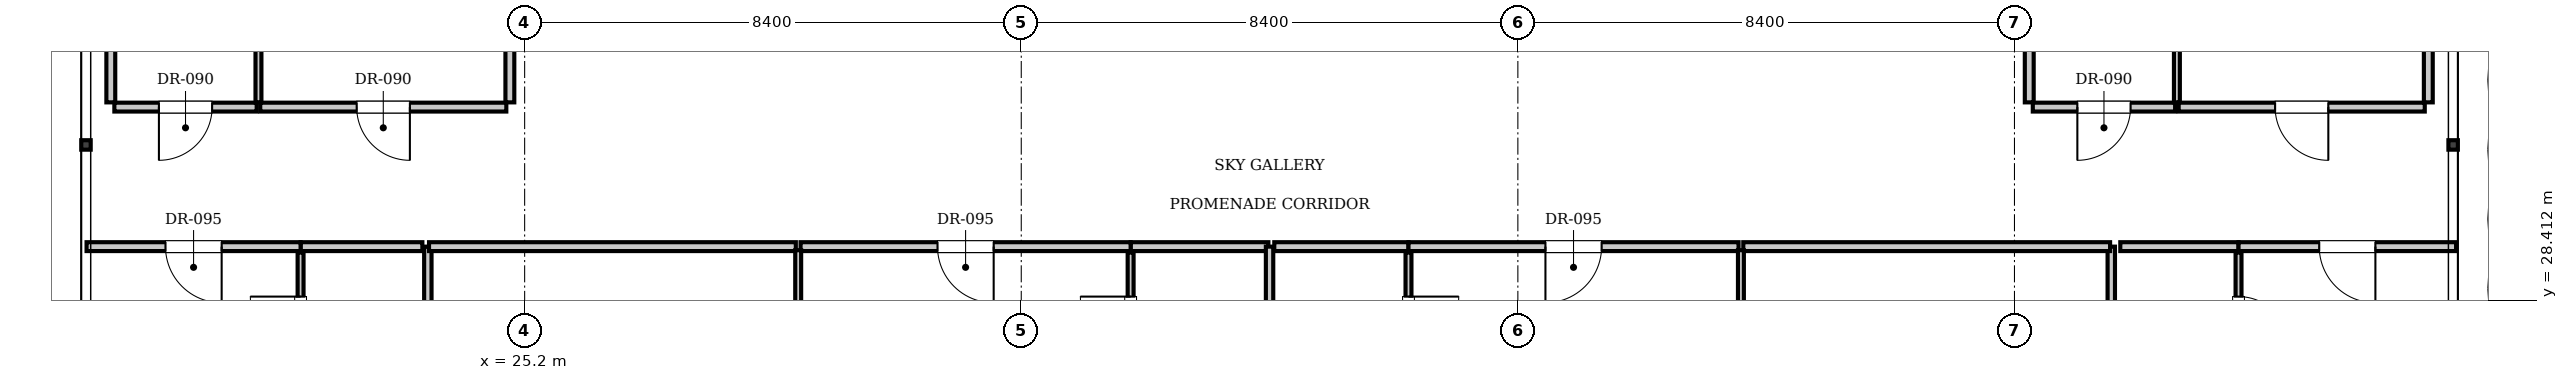
"""IFC4 building model, lengths in metres.
Left out: names, types, materials, properties, quantities, classifications, styles, units other than length and angle.
Written with IfcOpenShell. Run it as: python <this file> out.ifc"""

import sys

from ifc_helpers import new_model, si_unit, direction, frame, frame_2d, origin, place, context, subcontext, project, spatial, rectangle, extrude, element, fill, save


model = new_model("IFC4")
c1 = context("Model", 3, precision=1e-05, world=origin(), true_north=direction((0.0, 1.0)))
c2 = subcontext(c1, "Body", "Model", "MODEL_VIEW")
j1 = project(units=[si_unit("LENGTHUNIT", "METRE"), si_unit("PLANEANGLEUNIT", "RADIAN")], contexts=[c1])
p1 = place(None, origin())
s1 = spatial("IfcSite", under=j1, at=p1, CompositionType="ELEMENT")
p2 = place(p1, origin())
s2 = spatial("IfcBuilding", under=s1, at=p2, CompositionType="ELEMENT")
p3 = place(p2, frame((0.0, 0.0, 341.25)))
s3 = spatial("IfcBuildingStorey", under=s2, at=p3, CompositionType="ELEMENT", Elevation=341.25)
p4 = place(p3, frame((18.2, 31.76, 0.0), z_axis=(0.0, 0.0, 1.0), x_axis=(0.0, 1.0, 0.0)))
e1 = element("IfcWall", 1, at=p4, inside=s3, PredefinedType="PARTITIONING", context=c2, shape_type="SweptSolid", body=[
    extrude(rectangle(XDim=16.285, YDim=0.15, at=frame_2d((8.143, 0.0))), origin(), (0.0, 0.0, 1.0), 3.141),
])
p5 = place(p3, frame((24.95, 31.76, 0.0), z_axis=(0.0, 0.0, 1.0), x_axis=(0.0, 1.0, 0.0)))
e2 = element("IfcWall", 2, at=p5, inside=s3, PredefinedType="PARTITIONING", context=c2, shape_type="SweptSolid", body=[
    extrude(rectangle(XDim=16.285, YDim=0.15, at=frame_2d((8.143, 0.0))), origin(), (0.0, 0.0, 1.0), 3.61),
])
p6 = place(p3, frame((18.26, 31.68, 0.0), z_axis=(0.0, 0.0, 1.0), x_axis=(1.0, 0.0, 0.0)))
e3 = element("IfcWall", 3, at=p6, inside=s3, PredefinedType="PARTITIONING", context=c2, shape_type="SweptSolid", body=[
    extrude(rectangle(XDim=2.407, YDim=0.15, at=frame_2d((1.204, 0.0))), origin(), (0.0, 0.0, 1.0), 3.61),
])
p7 = place(p6, frame((0.754, 0.0, 0.0)))
e4 = element("IfcOpeningElement", 4, at=p7, cuts=e3, PredefinedType="OPENING", context=c2, shape_type="SweptSolid", body=[
    extrude(rectangle(XDim=0.9, YDim=2.1, at=frame_2d((0.45, 1.05))), frame((0.0, 0.085, 0.0), z_axis=(0.0, -1.0, 0.0), x_axis=(1.0, 0.0, 0.0)), (0.0, 0.0, 1.0), 0.17),
])
p8 = place(p3, frame((20.698, 31.76, 0.0), z_axis=(0.0, 0.0, 1.0), x_axis=(0.0, 1.0, 0.0)))
e5 = element("IfcWall", 5, at=p8, inside=s3, PredefinedType="PARTITIONING", context=c2, shape_type="SweptSolid", body=[
    extrude(rectangle(XDim=16.285, YDim=0.1, at=frame_2d((8.143, 0.0))), origin(), (0.0, 0.0, 1.0), 3.61),
])
p9 = place(p3, frame((20.728, 31.68, 0.0), z_axis=(0.0, 0.0, 1.0), x_axis=(1.0, 0.0, 0.0)))
e6 = element("IfcWall", 6, at=p9, inside=s3, PredefinedType="PARTITIONING", context=c2, shape_type="SweptSolid", body=[
    extrude(rectangle(XDim=4.162, YDim=0.15, at=frame_2d((2.081, 0.0))), origin(), (0.0, 0.0, 1.0), 3.61),
])
p10 = place(p9, frame((1.631, 0.0, 0.0)))
e7 = element("IfcOpeningElement", 7, at=p10, cuts=e6, PredefinedType="OPENING", context=c2, shape_type="SweptSolid", body=[
    extrude(rectangle(XDim=0.9, YDim=2.1, at=frame_2d((0.45, 1.05))), frame((0.0, 0.085, 0.0), z_axis=(0.0, -1.0, 0.0), x_axis=(1.0, 0.0, 0.0)), (0.0, 0.0, 1.0), 0.17),
])
p11 = place(p3, frame((50.65, 31.76, 0.0), z_axis=(0.0, 0.0, 1.0), x_axis=(0.0, 1.0, 0.0)))
e8 = element("IfcWall", 8, at=p11, inside=s3, PredefinedType="PARTITIONING", context=c2, shape_type="SweptSolid", body=[
    extrude(rectangle(XDim=16.285, YDim=0.15, at=frame_2d((8.143, 0.0))), origin(), (0.0, 0.0, 1.0), 3.61),
])
p12 = place(p3, frame((57.4, 31.76, 0.0), z_axis=(0.0, 0.0, 1.0), x_axis=(0.0, 1.0, 0.0)))
e9 = element("IfcWall", 9, at=p12, inside=s3, PredefinedType="PARTITIONING", context=c2, shape_type="SweptSolid", body=[
    extrude(rectangle(XDim=16.285, YDim=0.15, at=frame_2d((8.143, 0.0))), origin(), (0.0, 0.0, 1.0), 3.141),
])
p13 = place(p3, frame((50.71, 31.68, 0.0), z_axis=(0.0, 0.0, 1.0), x_axis=(1.0, 0.0, 0.0)))
e10 = element("IfcWall", 10, at=p13, inside=s3, PredefinedType="PARTITIONING", context=c2, shape_type="SweptSolid", body=[
    extrude(rectangle(XDim=2.407, YDim=0.15, at=frame_2d((1.204, 0.0))), origin(), (0.0, 0.0, 1.0), 3.61),
])
p14 = place(p13, frame((0.754, 0.0, 0.0)))
e11 = element("IfcOpeningElement", 11, at=p14, cuts=e10, PredefinedType="OPENING", context=c2, shape_type="SweptSolid", body=[
    extrude(rectangle(XDim=0.9, YDim=2.1, at=frame_2d((0.45, 1.05))), frame((0.0, 0.085, 0.0), z_axis=(0.0, -1.0, 0.0), x_axis=(1.0, 0.0, 0.0)), (0.0, 0.0, 1.0), 0.17),
])
p15 = place(p3, frame((53.147, 31.76, 0.0), z_axis=(0.0, 0.0, 1.0), x_axis=(0.0, 1.0, 0.0)))
e12 = element("IfcWall", 12, at=p15, inside=s3, PredefinedType="PARTITIONING", context=c2, shape_type="SweptSolid", body=[
    extrude(rectangle(XDim=16.285, YDim=0.1, at=frame_2d((8.143, 0.0))), origin(), (0.0, 0.0, 1.0), 3.61),
])
p16 = place(p3, frame((53.177, 31.68, 0.0), z_axis=(0.0, 0.0, 1.0), x_axis=(1.0, 0.0, 0.0)))
e13 = element("IfcWall", 13, at=p16, inside=s3, PredefinedType="PARTITIONING", context=c2, shape_type="SweptSolid", body=[
    extrude(rectangle(XDim=4.163, YDim=0.15, at=frame_2d((2.081, 0.0))), origin(), (0.0, 0.0, 1.0), 3.61),
])
p17 = place(p16, frame((1.631, 0.0, 0.0)))
e14 = element("IfcOpeningElement", 14, at=p17, cuts=e13, PredefinedType="OPENING", context=c2, shape_type="SweptSolid", body=[
    extrude(rectangle(XDim=0.9, YDim=2.1, at=frame_2d((0.45, 1.05))), frame((0.0, 0.085, 0.0), z_axis=(0.0, -1.0, 0.0), x_axis=(1.0, 0.0, 0.0)), (0.0, 0.0, 1.0), 0.17),
])
for number, where, z_axis, x_axis in (
    (15, (23.562, 19.34, 0.0), (0.0, 0.0, 1.0), (0.0, 1.0, 0.0)),
    (16, (52.038, 19.34, 0.0), (0.0, 0.0, 1.0), (0.0, 1.0, 0.0)),
):
    element("IfcWall", number, at=place(p3, frame(where, z_axis=z_axis, x_axis=x_axis)), inside=s3, PredefinedType="PARTITIONING", context=c2, shape_type="SweptSolid", body=[
        extrude(rectangle(XDim=9.98, YDim=0.125, at=frame_2d((4.99, 0.0))), origin(), (0.0, 0.0, 1.0), 3.61),
    ])
p18 = place(p3, frame((35.45, 29.32, 0.0), z_axis=(0.0, 0.0, 1.0), x_axis=(1.0, 0.0, 0.0)))
e17 = element("IfcWall", 17, at=p18, inside=s3, PredefinedType="PARTITIONING", context=c2, shape_type="SweptSolid", body=[
    extrude(rectangle(XDim=2.33, YDim=0.15, at=frame_2d((1.165, 0.0))), origin(), (0.0, 0.0, 1.0), 3.61),
])
p19 = place(p3, frame((35.45, 26.88, 0.0), z_axis=(0.0, 0.0, 1.0), x_axis=(0.0, 1.0, 0.0)))
e18 = element("IfcWall", 18, at=p19, inside=s3, PredefinedType="PARTITIONING", context=c2, shape_type="SweptSolid", body=[
    extrude(rectangle(XDim=2.34, YDim=0.1, at=frame_2d((1.17, 0.0))), origin(), (0.0, 0.0, 1.0), 3.61),
])
p20 = place(p19, frame((0.745, 0.0, 0.0)))
e19 = element("IfcOpeningElement", 19, at=p20, cuts=e18, PredefinedType="OPENING", context=c2, shape_type="SweptSolid", body=[
    extrude(rectangle(XDim=0.85, YDim=2.1, at=frame_2d((0.425, 1.05))), frame((0.0, 0.06, 0.0), z_axis=(0.0, -1.0, 0.0), x_axis=(1.0, 0.0, 0.0)), (0.0, 0.0, 1.0), 0.12),
])
p21 = place(p3, frame((23.583, 29.32, 0.0), z_axis=(0.0, 0.0, 1.0), x_axis=(1.0, 0.0, 0.0)))
e20 = element("IfcWall", 20, at=p21, inside=s3, PredefinedType="PARTITIONING", context=c2, shape_type="SweptSolid", body=[
    extrude(rectangle(XDim=6.205, YDim=0.15, at=frame_2d((3.102, 0.0))), origin(), (0.0, 0.0, 1.0), 3.61),
])
p22 = place(p3, frame((29.867, 29.32, 0.0), z_axis=(0.0, 0.0, 1.0), x_axis=(1.0, 0.0, 0.0)))
e21 = element("IfcWall", 21, at=p22, inside=s3, PredefinedType="PARTITIONING", context=c2, shape_type="SweptSolid", body=[
    extrude(rectangle(XDim=5.583, YDim=0.15, at=frame_2d((2.792, 0.0))), origin(), (0.0, 0.0, 1.0), 3.61),
])
p23 = place(p22, frame((2.316, 0.0, 0.0)))
e22 = element("IfcOpeningElement", 22, at=p23, cuts=e21, PredefinedType="OPENING", context=c2, shape_type="SweptSolid", body=[
    extrude(rectangle(XDim=0.95, YDim=2.15, at=frame_2d((0.475, 1.075))), frame((0.0, 0.085, 0.0), z_axis=(0.0, -1.0, 0.0), x_axis=(1.0, 0.0, 0.0)), (0.0, 0.0, 1.0), 0.17),
])
p24 = place(p3, frame((29.827, 13.83, 0.0), z_axis=(0.0, 0.0, 1.0), x_axis=(0.0, 1.0, 0.0)))
e23 = element("IfcWall", 23, at=p24, inside=s3, PredefinedType="PARTITIONING", context=c2, shape_type="SweptSolid", body=[
    extrude(rectangle(XDim=15.43, YDim=0.1, at=frame_2d((7.715, 0.0))), origin(), (0.0, 0.0, 1.0), 3.61),
])
p25 = place(p24, frame((1.6, 0.0, 0.0)))
e24 = element("IfcOpeningElement", 24, at=p25, cuts=e23, PredefinedType="OPENING", context=c2, shape_type="SweptSolid", body=[
    extrude(rectangle(XDim=0.9, YDim=2.1, at=frame_2d((0.45, 1.05))), frame((0.0, 0.06, 0.0), z_axis=(0.0, -1.0, 0.0), x_axis=(1.0, 0.0, 0.0)), (0.0, 0.0, 1.0), 0.12),
])
p26 = place(p3, frame((37.8, 13.9, 0.0), z_axis=(0.0, 0.0, 1.0), x_axis=(0.0, 1.0, 0.0)))
e25 = element("IfcWall", 25, at=p26, inside=s3, PredefinedType="PARTITIONING", context=c2, shape_type="SweptSolid", body=[
    extrude(rectangle(XDim=15.42, YDim=0.125, at=frame_2d((7.71, 0.0))), origin(), (0.0, 0.0, 1.0), 3.457),
])
p27 = place(p3, frame((37.88, 29.32, 0.0), z_axis=(0.0, 0.0, 1.0), x_axis=(1.0, 0.0, 0.0)))
e26 = element("IfcWall", 26, at=p27, inside=s3, PredefinedType="PARTITIONING", context=c2, shape_type="SweptSolid", body=[
    extrude(rectangle(XDim=2.27, YDim=0.15, at=frame_2d((1.135, 0.0))), origin(), (0.0, 0.0, 1.0), 3.61),
])
p28 = place(p3, frame((40.15, 26.88, 0.0), z_axis=(0.0, 0.0, 1.0), x_axis=(0.0, 1.0, 0.0)))
e27 = element("IfcWall", 27, at=p28, inside=s3, PredefinedType="PARTITIONING", context=c2, shape_type="SweptSolid", body=[
    extrude(rectangle(XDim=2.34, YDim=0.1, at=frame_2d((1.17, 0.0))), origin(), (0.0, 0.0, 1.0), 3.61),
])
p29 = place(p28, frame((0.745, 0.0, 0.0)))
e28 = element("IfcOpeningElement", 28, at=p29, cuts=e27, PredefinedType="OPENING", context=c2, shape_type="SweptSolid", body=[
    extrude(rectangle(XDim=0.85, YDim=2.1, at=frame_2d((0.425, 1.05))), frame((0.0, 0.06, 0.0), z_axis=(0.0, -1.0, 0.0), x_axis=(1.0, 0.0, 0.0)), (0.0, 0.0, 1.0), 0.12),
])
p30 = place(p3, frame((40.15, 29.32, 0.0), z_axis=(0.0, 0.0, 1.0), x_axis=(1.0, 0.0, 0.0)))
e29 = element("IfcWall", 29, at=p30, inside=s3, PredefinedType="PARTITIONING", context=c2, shape_type="SweptSolid", body=[
    extrude(rectangle(XDim=5.583, YDim=0.15, at=frame_2d((2.792, 0.0))), origin(), (0.0, 0.0, 1.0), 3.61),
])
p31 = place(p30, frame((2.316, 0.0, 0.0)))
e30 = element("IfcOpeningElement", 30, at=p31, cuts=e29, PredefinedType="OPENING", context=c2, shape_type="SweptSolid", body=[
    extrude(rectangle(XDim=0.95, YDim=2.15, at=frame_2d((0.475, 1.075))), frame((0.0, 0.085, 0.0), z_axis=(0.0, -1.0, 0.0), x_axis=(1.0, 0.0, 0.0)), (0.0, 0.0, 1.0), 0.17),
])
p32 = place(p3, frame((45.813, 29.32, 0.0), z_axis=(0.0, 0.0, 1.0), x_axis=(1.0, 0.0, 0.0)))
e31 = element("IfcWall", 31, at=p32, inside=s3, PredefinedType="PARTITIONING", context=c2, shape_type="SweptSolid", body=[
    extrude(rectangle(XDim=6.205, YDim=0.15, at=frame_2d((3.102, 0.0))), origin(), (0.0, 0.0, 1.0), 3.61),
])
p33 = place(p3, frame((45.773, 13.83, 0.0), z_axis=(0.0, 0.0, 1.0), x_axis=(0.0, 1.0, 0.0)))
e32 = element("IfcWall", 32, at=p33, inside=s3, PredefinedType="PARTITIONING", context=c2, shape_type="SweptSolid", body=[
    extrude(rectangle(XDim=15.43, YDim=0.1, at=frame_2d((7.715, 0.0))), origin(), (0.0, 0.0, 1.0), 3.61),
])
p34 = place(p33, frame((1.6, 0.0, 0.0)))
e33 = element("IfcOpeningElement", 33, at=p34, cuts=e32, PredefinedType="OPENING", context=c2, shape_type="SweptSolid", body=[
    extrude(rectangle(XDim=0.9, YDim=2.1, at=frame_2d((0.45, 1.05))), frame((0.0, 0.06, 0.0), z_axis=(0.0, -1.0, 0.0), x_axis=(1.0, 0.0, 0.0)), (0.0, 0.0, 1.0), 0.12),
])
p35 = place(p3, frame((21.41, 29.32, 0.0), z_axis=(0.0, 0.0, 1.0), x_axis=(1.0, 0.0, 0.0)))
e34 = element("IfcWall", 34, at=p35, inside=s3, PredefinedType="PARTITIONING", context=c2, shape_type="SweptSolid", body=[
    extrude(rectangle(XDim=2.06, YDim=0.15, at=frame_2d((1.03, 0.0))), origin(), (0.0, 0.0, 1.0), 3.61),
])
p36 = place(p3, frame((21.41, 26.88, 0.0), z_axis=(0.0, 0.0, 1.0), x_axis=(0.0, 1.0, 0.0)))
e35 = element("IfcWall", 35, at=p36, inside=s3, PredefinedType="PARTITIONING", context=c2, shape_type="SweptSolid", body=[
    extrude(rectangle(XDim=2.34, YDim=0.1, at=frame_2d((1.17, 0.0))), origin(), (0.0, 0.0, 1.0), 3.61),
])
p37 = place(p36, frame((0.745, 0.0, 0.0)))
e36 = element("IfcOpeningElement", 36, at=p37, cuts=e35, PredefinedType="OPENING", context=c2, shape_type="SweptSolid", body=[
    extrude(rectangle(XDim=0.85, YDim=2.1, at=frame_2d((0.425, 1.05))), frame((0.0, 0.06, 0.0), z_axis=(0.0, -1.0, 0.0), x_axis=(1.0, 0.0, 0.0)), (0.0, 0.0, 1.0), 0.12),
])
p38 = place(p3, frame((17.79, 29.32, 0.0), z_axis=(0.0, 0.0, 1.0), x_axis=(1.0, 0.0, 0.0)))
e37 = element("IfcWall", 37, at=p38, inside=s3, PredefinedType="PARTITIONING", context=c2, shape_type="SweptSolid", body=[
    extrude(rectangle(XDim=3.62, YDim=0.15, at=frame_2d((1.81, 0.0))), origin(), (0.0, 0.0, 1.0), 3.61),
])
p39 = place(p38, frame((1.335, 0.0, 0.0)))
e38 = element("IfcOpeningElement", 38, at=p39, cuts=e37, PredefinedType="OPENING", context=c2, shape_type="SweptSolid", body=[
    extrude(rectangle(XDim=0.95, YDim=2.15, at=frame_2d((0.475, 1.075))), frame((0.0, 0.085, 0.0), z_axis=(0.0, -1.0, 0.0), x_axis=(1.0, 0.0, 0.0)), (0.0, 0.0, 1.0), 0.17),
])
p40 = place(p3, frame((52.19, 29.32, 0.0), z_axis=(0.0, 0.0, 1.0), x_axis=(1.0, 0.0, 0.0)))
e39 = element("IfcWall", 39, at=p40, inside=s3, PredefinedType="PARTITIONING", context=c2, shape_type="SweptSolid", body=[
    extrude(rectangle(XDim=2.0, YDim=0.15, at=frame_2d((1.0, 0.0))), origin(), (0.0, 0.0, 1.0), 3.61),
])
p41 = place(p3, frame((54.19, 26.88, 0.0), z_axis=(0.0, 0.0, 1.0), x_axis=(0.0, 1.0, 0.0)))
e40 = element("IfcWall", 40, at=p41, inside=s3, PredefinedType="PARTITIONING", context=c2, shape_type="SweptSolid", body=[
    extrude(rectangle(XDim=2.34, YDim=0.1, at=frame_2d((1.17, 0.0))), origin(), (0.0, 0.0, 1.0), 3.61),
])
p42 = place(p41, frame((0.745, 0.0, 0.0)))
e41 = element("IfcOpeningElement", 41, at=p42, cuts=e40, PredefinedType="OPENING", context=c2, shape_type="SweptSolid", body=[
    extrude(rectangle(XDim=0.85, YDim=2.1, at=frame_2d((0.425, 1.05))), frame((0.0, 0.06, 0.0), z_axis=(0.0, -1.0, 0.0), x_axis=(1.0, 0.0, 0.0)), (0.0, 0.0, 1.0), 0.12),
])
p43 = place(p3, frame((54.19, 29.32, 0.0), z_axis=(0.0, 0.0, 1.0), x_axis=(1.0, 0.0, 0.0)))
e42 = element("IfcWall", 42, at=p43, inside=s3, PredefinedType="PARTITIONING", context=c2, shape_type="SweptSolid", body=[
    extrude(rectangle(XDim=3.68, YDim=0.15, at=frame_2d((1.84, 0.0))), origin(), (0.0, 0.0, 1.0), 3.61),
])
p44 = place(p43, frame((1.365, 0.0, 0.0)))
e43 = element("IfcOpeningElement", 43, at=p44, cuts=e42, PredefinedType="OPENING", context=c2, shape_type="SweptSolid", body=[
    extrude(rectangle(XDim=0.95, YDim=2.15, at=frame_2d((0.475, 1.075))), frame((0.0, 0.085, 0.0), z_axis=(0.0, -1.0, 0.0), x_axis=(1.0, 0.0, 0.0)), (0.0, 0.0, 1.0), 0.17),
])
p45 = place(p7, frame((0.9, 0.0, 0.0), z_axis=(0.0, 0.0, 1.0), x_axis=(-1.0, 0.0, 0.0)))
e44 = element("IfcDoor", 44, at=p45, inside=s3, OperationType="SINGLE_SWING_RIGHT", PredefinedType="DOOR", context=c2, shape_type="SweptSolid", body=[
    extrude(rectangle(XDim=0.9, YDim=2.1, at=frame_2d((0.45, 1.05))), frame((0.0, 0.025, 0.0), z_axis=(0.0, -1.0, 0.0), x_axis=(1.0, 0.0, 0.0)), (0.0, 0.0, 1.0), 0.05),
])
fill(e4, e44)
p46 = place(p10, frame((0.9, 0.0, 0.0), z_axis=(0.0, 0.0, 1.0), x_axis=(-1.0, 0.0, 0.0)))
e45 = element("IfcDoor", 45, at=p46, inside=s3, OperationType="SINGLE_SWING_LEFT", PredefinedType="DOOR", context=c2, shape_type="SweptSolid", body=[
    extrude(rectangle(XDim=0.9, YDim=2.1, at=frame_2d((0.45, 1.05))), frame((0.0, 0.025, 0.0), z_axis=(0.0, -1.0, 0.0), x_axis=(1.0, 0.0, 0.0)), (0.0, 0.0, 1.0), 0.05),
])
fill(e7, e45)
p47 = place(p14, frame((0.9, 0.0, 0.0), z_axis=(0.0, 0.0, 1.0), x_axis=(-1.0, 0.0, 0.0)))
e46 = element("IfcDoor", 46, at=p47, inside=s3, OperationType="SINGLE_SWING_RIGHT", PredefinedType="DOOR", context=c2, shape_type="SweptSolid", body=[
    extrude(rectangle(XDim=0.9, YDim=2.1, at=frame_2d((0.45, 1.05))), frame((0.0, 0.025, 0.0), z_axis=(0.0, -1.0, 0.0), x_axis=(1.0, 0.0, 0.0)), (0.0, 0.0, 1.0), 0.05),
])
fill(e11, e46)
p48 = place(p17, frame((0.9, 0.0, 0.0), z_axis=(0.0, 0.0, 1.0), x_axis=(-1.0, 0.0, 0.0)))
e47 = element("IfcDoor", 47, at=p48, inside=s3, OperationType="SINGLE_SWING_LEFT", PredefinedType="DOOR", context=c2, shape_type="SweptSolid", body=[
    extrude(rectangle(XDim=0.9, YDim=2.1, at=frame_2d((0.45, 1.05))), frame((0.0, 0.025, 0.0), z_axis=(0.0, -1.0, 0.0), x_axis=(1.0, 0.0, 0.0)), (0.0, 0.0, 1.0), 0.05),
])
fill(e14, e47)
p49 = place(p20, origin())
e48 = element("IfcDoor", 48, at=p49, inside=s3, OperationType="SINGLE_SWING_RIGHT", PredefinedType="DOOR", context=c2, shape_type="SweptSolid", body=[
    extrude(rectangle(XDim=0.85, YDim=2.1, at=frame_2d((0.425, 1.05))), frame((0.0, 0.025, 0.0), z_axis=(0.0, -1.0, 0.0), x_axis=(1.0, 0.0, 0.0)), (0.0, 0.0, 1.0), 0.05),
])
fill(e19, e48)
p50 = place(p23, frame((0.95, 0.0, 0.0), z_axis=(0.0, 0.0, 1.0), x_axis=(-1.0, 0.0, 0.0)))
e49 = element("IfcDoor", 49, at=p50, inside=s3, OperationType="SINGLE_SWING_LEFT", PredefinedType="DOOR", context=c2, shape_type="SweptSolid", body=[
    extrude(rectangle(XDim=0.95, YDim=2.15, at=frame_2d((0.475, 1.075))), frame((0.0, 0.025, 0.0), z_axis=(0.0, -1.0, 0.0), x_axis=(1.0, 0.0, 0.0)), (0.0, 0.0, 1.0), 0.05),
])
fill(e22, e49)
p51 = place(p29, frame((0.85, 0.0, 0.0), z_axis=(0.0, 0.0, 1.0), x_axis=(-1.0, 0.0, 0.0)))
e50 = element("IfcDoor", 50, at=p51, inside=s3, OperationType="SINGLE_SWING_LEFT", PredefinedType="DOOR", context=c2, shape_type="SweptSolid", body=[
    extrude(rectangle(XDim=0.85, YDim=2.1, at=frame_2d((0.425, 1.05))), frame((0.0, 0.025, 0.0), z_axis=(0.0, -1.0, 0.0), x_axis=(1.0, 0.0, 0.0)), (0.0, 0.0, 1.0), 0.05),
])
fill(e28, e50)
p52 = place(p31, frame((0.95, 0.0, 0.0), z_axis=(0.0, 0.0, 1.0), x_axis=(-1.0, 0.0, 0.0)))
e51 = element("IfcDoor", 51, at=p52, inside=s3, OperationType="SINGLE_SWING_RIGHT", PredefinedType="DOOR", context=c2, shape_type="SweptSolid", body=[
    extrude(rectangle(XDim=0.95, YDim=2.15, at=frame_2d((0.475, 1.075))), frame((0.0, 0.025, 0.0), z_axis=(0.0, -1.0, 0.0), x_axis=(1.0, 0.0, 0.0)), (0.0, 0.0, 1.0), 0.05),
])
fill(e30, e51)
p53 = place(p37, origin())
e52 = element("IfcDoor", 52, at=p53, inside=s3, OperationType="SINGLE_SWING_RIGHT", PredefinedType="DOOR", context=c2, shape_type="SweptSolid", body=[
    extrude(rectangle(XDim=0.85, YDim=2.1, at=frame_2d((0.425, 1.05))), frame((0.0, 0.025, 0.0), z_axis=(0.0, -1.0, 0.0), x_axis=(1.0, 0.0, 0.0)), (0.0, 0.0, 1.0), 0.05),
])
fill(e36, e52)
p54 = place(p39, frame((0.95, 0.0, 0.0), z_axis=(0.0, 0.0, 1.0), x_axis=(-1.0, 0.0, 0.0)))
e53 = element("IfcDoor", 53, at=p54, inside=s3, OperationType="SINGLE_SWING_LEFT", PredefinedType="DOOR", context=c2, shape_type="SweptSolid", body=[
    extrude(rectangle(XDim=0.95, YDim=2.15, at=frame_2d((0.475, 1.075))), frame((0.0, 0.025, 0.0), z_axis=(0.0, -1.0, 0.0), x_axis=(1.0, 0.0, 0.0)), (0.0, 0.0, 1.0), 0.05),
])
fill(e38, e53)
p55 = place(p42, frame((0.85, 0.0, 0.0), z_axis=(0.0, 0.0, 1.0), x_axis=(-1.0, 0.0, 0.0)))
e54 = element("IfcDoor", 54, at=p55, inside=s3, OperationType="SINGLE_SWING_RIGHT", PredefinedType="DOOR", context=c2, shape_type="SweptSolid", body=[
    extrude(rectangle(XDim=0.85, YDim=2.1, at=frame_2d((0.425, 1.05))), frame((0.0, 0.025, 0.0), z_axis=(0.0, -1.0, 0.0), x_axis=(1.0, 0.0, 0.0)), (0.0, 0.0, 1.0), 0.05),
])
fill(e41, e54)
p56 = place(p44, frame((0.95, 0.0, 0.0), z_axis=(0.0, 0.0, 1.0), x_axis=(-1.0, 0.0, 0.0)))
e55 = element("IfcDoor", 55, at=p56, inside=s3, OperationType="SINGLE_SWING_LEFT", PredefinedType="DOOR", context=c2, shape_type="SweptSolid", body=[
    extrude(rectangle(XDim=0.95, YDim=2.15, at=frame_2d((0.475, 1.075))), frame((0.0, 0.025, 0.0), z_axis=(0.0, -1.0, 0.0), x_axis=(1.0, 0.0, 0.0)), (0.0, 0.0, 1.0), 0.05),
])
fill(e43, e55)
save(model, sys.argv[1])
